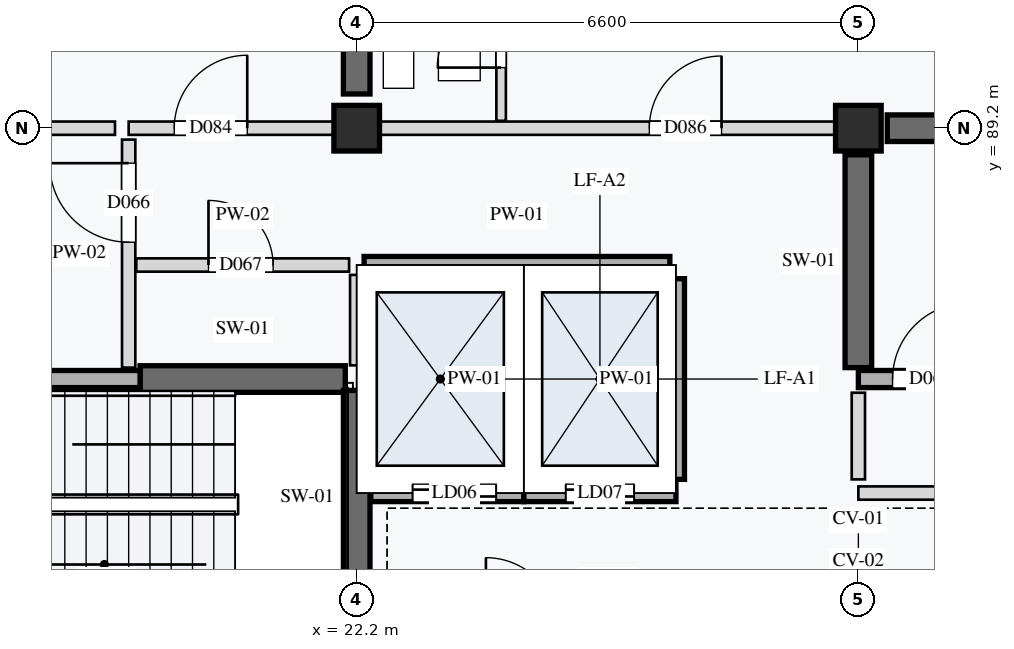
"""IFC4 building model, lengths in metres.
Left out: names, types, materials, properties, quantities, classifications, styles, units other than length and angle.
Written with IfcOpenShell. Run it as: python <this file> out.ifc"""

import sys

from ifc_helpers import new_model, si_unit, direction, frame, frame_2d, origin, origin_2d, place, context, subcontext, project, spatial, rectangle, extrude, element, fill, save


model = new_model("IFC4")
c1 = context("Model", 3, precision=1e-05, world=origin(), true_north=direction((0.0, 1.0)))
c2 = subcontext(c1, "Body", "Model", "MODEL_VIEW")
j1 = project(units=[si_unit("LENGTHUNIT", "METRE"), si_unit("PLANEANGLEUNIT", "RADIAN")], contexts=[c1])
p1 = place(None, origin())
s1 = spatial("IfcSite", under=j1, at=p1, CompositionType="ELEMENT")
p2 = place(p1, origin())
s2 = spatial("IfcBuilding", under=s1, at=p2, CompositionType="ELEMENT")
p3 = place(p2, frame((0.0, 0.0, 8.4)))
s3 = spatial("IfcBuildingStorey", under=s2, at=p3, CompositionType="ELEMENT", Elevation=8.4)
for number, where, z_axis, x_axis in (
    (1, (22.2, 89.2, 0.0), (0.0, 0.0, 1.0), (1.0, 0.0, 0.0)),
    (2, (28.8, 89.2, 0.0), (0.0, 0.0, 1.0), (1.0, 0.0, 0.0)),
):
    element("IfcColumn", number, at=place(p3, frame(where, z_axis=z_axis, x_axis=x_axis)), inside=s3, PredefinedType="COLUMN", context=c2, shape_type="SweptSolid", body=[
        extrude(rectangle(XDim=0.6, YDim=0.6, at=origin_2d()), origin(), (0.0, 0.0, 1.0), 3.2),
    ])
p4 = place(p3, frame((19.35, 85.9, 0.0), z_axis=(0.0, 0.0, 1.0), x_axis=(1.0, 0.0, 0.0)))
e3 = element("IfcWall", 3, at=p4, inside=s3, PredefinedType="SHEAR", context=c2, shape_type="SweptSolid", body=[
    extrude(rectangle(XDim=2.7, YDim=0.35, at=frame_2d((1.35, 0.0))), origin(), (0.0, 0.0, 1.0), 2.96),
])
p5 = place(p3, frame((22.2, 82.95, 0.0), z_axis=(0.0, 0.0, 1.0), x_axis=(0.0, 1.0, 0.0)))
e4 = element("IfcWall", 4, at=p5, inside=s3, PredefinedType="SHEAR", context=c2, shape_type="SweptSolid", body=[
    extrude(rectangle(XDim=2.8, YDim=0.35, at=frame_2d((1.4, 0.0))), origin(), (0.0, 0.0, 1.0), 2.96),
])
p6 = place(p3, frame((29.18, 89.2, 0.0), z_axis=(0.0, 0.0, 1.0), x_axis=(1.0, 0.0, 0.0)))
e5 = element("IfcWall", 5, at=p6, inside=s3, PredefinedType="SHEAR", context=c2, shape_type="SweptSolid", body=[
    extrude(rectangle(XDim=5.84, YDim=0.35, at=frame_2d((2.92, 0.0))), origin(), (0.0, 0.0, 1.0), 2.96),
])
p7 = place(p3, frame((28.8, 86.05, 0.0), z_axis=(0.0, 0.0, 1.0), x_axis=(0.0, 1.0, 0.0)))
e6 = element("IfcWall", 6, at=p7, inside=s3, PredefinedType="SHEAR", context=c2, shape_type="SweptSolid", body=[
    extrude(rectangle(XDim=2.8, YDim=0.35, at=frame_2d((1.4, 0.0))), origin(), (0.0, 0.0, 1.0), 2.96),
])
p8 = place(p3, frame((22.2, 89.65, 0.0), z_axis=(0.0, 0.0, 1.0), x_axis=(0.0, 1.0, 0.0)))
e7 = element("IfcWall", 7, at=p8, inside=s3, PredefinedType="SHEAR", context=c2, shape_type="SweptSolid", body=[
    extrude(rectangle(XDim=5.7, YDim=0.35, at=frame_2d((2.85, 0.0))), origin(), (0.0, 0.0, 1.0), 2.96),
])
p9 = place(p3, frame((15.75, 85.9, 0.0), z_axis=(0.0, 0.0, 1.0), x_axis=(1.0, 0.0, 0.0)))
e8 = element("IfcWall", 8, at=p9, inside=s3, PredefinedType="STANDARD", context=c2, shape_type="SweptSolid", body=[
    extrude(rectangle(XDim=3.6, YDim=0.225, at=frame_2d((1.8, 0.0))), origin(), (0.0, 0.0, 1.0), 2.96),
])
p10 = place(p9, frame((0.45, 0.0, 0.0)))
e9 = element("IfcOpeningElement", 9, at=p10, cuts=e8, PredefinedType="OPENING", context=c2, shape_type="SweptSolid", body=[
    extrude(rectangle(XDim=1.0, YDim=2.16, at=frame_2d((0.5, 1.08))), frame((0.0, 0.123, 0.0), z_axis=(0.0, -1.0, 0.0), x_axis=(1.0, 0.0, 0.0)), (0.0, 0.0, 1.0), 0.245),
])
p11 = place(p3, frame((19.2, 86.05, 0.0), z_axis=(0.0, 0.0, 1.0), x_axis=(0.0, 1.0, 0.0)))
e10 = element("IfcWall", 10, at=p11, inside=s3, PredefinedType="PARTITIONING", context=c2, shape_type="SweptSolid", body=[
    extrude(rectangle(XDim=3.0, YDim=0.175, at=frame_2d((1.5, 0.0))), origin(), (0.0, 0.0, 1.0), 2.96),
])
p12 = place(p11, frame((1.65, 0.0, 0.0)))
e11 = element("IfcOpeningElement", 11, at=p12, cuts=e10, PredefinedType="OPENING", context=c2, shape_type="SweptSolid", body=[
    extrude(rectangle(XDim=1.04, YDim=2.12, at=frame_2d((0.52, 1.06))), frame((0.0, 0.097, 0.0), z_axis=(0.0, -1.0, 0.0), x_axis=(1.0, 0.0, 0.0)), (0.0, 0.0, 1.0), 0.195),
])
p13 = place(p3, frame((19.3, 87.4, 0.0), z_axis=(0.0, 0.0, 1.0), x_axis=(1.0, 0.0, 0.0)))
e12 = element("IfcWall", 12, at=p13, inside=s3, PredefinedType="PARTITIONING", context=c2, shape_type="SweptSolid", body=[
    extrude(rectangle(XDim=2.8, YDim=0.175, at=frame_2d((1.4, 0.0))), origin(), (0.0, 0.0, 1.0), 2.96),
])
p14 = place(p13, frame((0.95, 0.0, 0.0)))
e13 = element("IfcOpeningElement", 13, at=p14, cuts=e12, PredefinedType="OPENING", context=c2, shape_type="SweptSolid", body=[
    extrude(rectangle(XDim=0.85, YDim=2.0, at=frame_2d((0.425, 1.0))), frame((0.0, 0.097, 0.0), z_axis=(0.0, -1.0, 0.0), x_axis=(1.0, 0.0, 0.0)), (0.0, 0.0, 1.0), 0.195),
])
p15 = place(p3, frame((22.2, 86.08, 0.0), z_axis=(0.0, 0.0, 1.0), x_axis=(0.0, 1.0, 0.0)))
e14 = element("IfcWall", 14, at=p15, inside=s3, PredefinedType="PARTITIONING", context=c2, shape_type="SweptSolid", body=[
    extrude(rectangle(XDim=1.19, YDim=0.175, at=frame_2d((0.595, 0.0))), origin(), (0.0, 0.0, 1.0), 2.96),
])
p16 = place(p3, frame((22.385, 84.4, 0.0), z_axis=(0.0, 0.0, 1.0), x_axis=(1.0, 0.0, 0.0)))
e15 = element("IfcWall", 15, at=p16, inside=s3, PredefinedType="STANDARD", context=c2, shape_type="SweptSolid", body=[
    extrude(rectangle(XDim=2.015, YDim=0.225, at=frame_2d((1.007, 0.0))), origin(), (0.0, 0.0, 1.0), 2.96),
])
p17 = place(p16, frame((0.55, 0.0, 0.0)))
e16 = element("IfcOpeningElement", 16, at=p17, cuts=e15, PredefinedType="OPENING", context=c2, shape_type="SweptSolid", body=[
    extrude(rectangle(XDim=1.1, YDim=2.1, at=frame_2d((0.55, 1.05))), frame((0.0, 0.123, 0.0), z_axis=(0.0, -1.0, 0.0), x_axis=(1.0, 0.0, 0.0)), (0.0, 0.0, 1.0), 0.245),
])
p18 = place(p3, frame((24.4, 84.4, 0.0), z_axis=(0.0, 0.0, 1.0), x_axis=(1.0, 0.0, 0.0)))
e17 = element("IfcWall", 17, at=p18, inside=s3, PredefinedType="STANDARD", context=c2, shape_type="SweptSolid", body=[
    extrude(rectangle(XDim=2.0, YDim=0.225, at=frame_2d((1.0, 0.0))), origin(), (0.0, 0.0, 1.0), 2.96),
])
p19 = place(p18, frame((0.55, 0.0, 0.0)))
e18 = element("IfcOpeningElement", 18, at=p19, cuts=e17, PredefinedType="OPENING", context=c2, shape_type="SweptSolid", body=[
    extrude(rectangle(XDim=0.9, YDim=2.1, at=frame_2d((0.45, 1.05))), frame((0.0, 0.123, 0.0), z_axis=(0.0, -1.0, 0.0), x_axis=(1.0, 0.0, 0.0)), (0.0, 0.0, 1.0), 0.245),
])
p20 = place(p3, frame((22.298, 87.4, 0.0), z_axis=(0.0, 0.0, 1.0), x_axis=(1.0, 0.0, 0.0)))
e19 = element("IfcWall", 19, at=p20, inside=s3, PredefinedType="STANDARD", context=c2, shape_type="SweptSolid", body=[
    extrude(rectangle(XDim=4.022, YDim=0.225, at=frame_2d((2.011, 0.0))), origin(), (0.0, 0.0, 1.0), 2.96),
])
for number, where, z_axis, x_axis in (
    (20, (24.4, 84.58, 0.0), (0.0, 0.0, 1.0), (0.0, 1.0, 0.0)),
    (21, (26.4, 84.58, 0.0), (0.0, 0.0, 1.0), (0.0, 1.0, 0.0)),
):
    element("IfcWall", number, at=place(p3, frame(where, z_axis=z_axis, x_axis=x_axis)), inside=s3, PredefinedType="STANDARD", context=c2, shape_type="SweptSolid", body=[
        extrude(rectangle(XDim=2.64, YDim=0.225, at=frame_2d((1.32, 0.0))), origin(), (0.0, 0.0, 1.0), 2.96),
    ])
p21 = place(p3, frame((28.8, 85.9, 0.0), z_axis=(0.0, 0.0, 1.0), x_axis=(1.0, 0.0, 0.0)))
e22 = element("IfcWall", 22, at=p21, inside=s3, PredefinedType="STANDARD", context=c2, shape_type="SweptSolid", body=[
    extrude(rectangle(XDim=3.45, YDim=0.225, at=frame_2d((1.725, 0.0))), origin(), (0.0, 0.0, 1.0), 2.96),
])
p22 = place(p21, frame((0.45, 0.0, 0.0)))
e23 = element("IfcOpeningElement", 23, at=p22, cuts=e22, PredefinedType="OPENING", context=c2, shape_type="SweptSolid", body=[
    extrude(rectangle(XDim=1.0, YDim=2.1, at=frame_2d((0.5, 1.05))), frame((0.0, 0.123, 0.0), z_axis=(0.0, -1.0, 0.0), x_axis=(1.0, 0.0, 0.0)), (0.0, 0.0, 1.0), 0.245),
])
p23 = place(p3, frame((28.8, 84.4, 0.0), z_axis=(0.0, 0.0, 1.0), x_axis=(1.0, 0.0, 0.0)))
e24 = element("IfcWall", 24, at=p23, inside=s3, PredefinedType="PARTITIONING", context=c2, shape_type="SweptSolid", body=[
    extrude(rectangle(XDim=3.3, YDim=0.175, at=frame_2d((1.65, 0.0))), origin(), (0.0, 0.0, 1.0), 2.96),
])
p24 = place(p23, frame((1.8, 0.0, 0.0)))
e25 = element("IfcOpeningElement", 25, at=p24, cuts=e24, PredefinedType="OPENING", context=c2, shape_type="SweptSolid", body=[
    extrude(rectangle(XDim=1.0, YDim=2.16, at=frame_2d((0.5, 1.08))), frame((0.0, 0.097, 0.0), z_axis=(0.0, -1.0, 0.0), x_axis=(1.0, 0.0, 0.0)), (0.0, 0.0, 1.0), 0.195),
])
p25 = place(p3, frame((28.8, 84.58, 0.0), z_axis=(0.0, 0.0, 1.0), x_axis=(0.0, 1.0, 0.0)))
e26 = element("IfcWall", 26, at=p25, inside=s3, PredefinedType="PARTITIONING", context=c2, shape_type="SweptSolid", body=[
    extrude(rectangle(XDim=1.14, YDim=0.175, at=frame_2d((0.57, 0.0))), origin(), (0.0, 0.0, 1.0), 2.96),
])
p26 = place(p3, frame((15.88, 89.2, 0.0), z_axis=(0.0, 0.0, 1.0), x_axis=(1.0, 0.0, 0.0)))
e27 = element("IfcWall", 27, at=p26, inside=s3, PredefinedType="PARTITIONING", context=c2, shape_type="SweptSolid", body=[
    extrude(rectangle(XDim=3.14, YDim=0.175, at=frame_2d((1.57, 0.0))), origin(), (0.0, 0.0, 1.0), 2.55),
])
p27 = place(p3, frame((19.2, 89.2, 0.0), z_axis=(0.0, 0.0, 1.0), x_axis=(1.0, 0.0, 0.0)))
e28 = element("IfcWall", 28, at=p27, inside=s3, PredefinedType="PARTITIONING", context=c2, shape_type="SweptSolid", body=[
    extrude(rectangle(XDim=3.0, YDim=0.175, at=frame_2d((1.5, 0.0))), origin(), (0.0, 0.0, 1.0), 2.55),
])
p28 = place(p27, frame((0.6, 0.0, 0.0)))
e29 = element("IfcOpeningElement", 29, at=p28, cuts=e28, PredefinedType="OPENING", context=c2, shape_type="SweptSolid", body=[
    extrude(rectangle(XDim=0.96, YDim=2.18, at=frame_2d((0.48, 1.09))), frame((0.0, 0.097, 0.0), z_axis=(0.0, -1.0, 0.0), x_axis=(1.0, 0.0, 0.0)), (0.0, 0.0, 1.0), 0.195),
])
p29 = place(p3, frame((22.2, 89.2, 0.0), z_axis=(0.0, 0.0, 1.0), x_axis=(1.0, 0.0, 0.0)))
e30 = element("IfcWall", 30, at=p29, inside=s3, PredefinedType="PARTITIONING", context=c2, shape_type="SweptSolid", body=[
    extrude(rectangle(XDim=6.6, YDim=0.175, at=frame_2d((3.3, 0.0))), origin(), (0.0, 0.0, 1.0), 2.55),
])
p30 = place(p29, frame((3.85, 0.0, 0.0)))
e31 = element("IfcOpeningElement", 31, at=p30, cuts=e30, PredefinedType="OPENING", context=c2, shape_type="SweptSolid", body=[
    extrude(rectangle(XDim=0.95, YDim=2.16, at=frame_2d((0.475, 1.08))), frame((0.0, 0.097, 0.0), z_axis=(0.0, -1.0, 0.0), x_axis=(1.0, 0.0, 0.0)), (0.0, 0.0, 1.0), 0.195),
])
p31 = place(p3, frame((24.1, 89.298, 0.0), z_axis=(0.0, 0.0, 1.0), x_axis=(0.0, 1.0, 0.0)))
e32 = element("IfcWall", 32, at=p31, inside=s3, PredefinedType="PARTITIONING", context=c2, shape_type="SweptSolid", body=[
    extrude(rectangle(XDim=2.302, YDim=0.125, at=frame_2d((1.151, 0.0))), origin(), (0.0, 0.0, 1.0), 2.96),
])
p32 = place(p31, frame((0.7, 0.0, 0.0)))
e33 = element("IfcOpeningElement", 33, at=p32, cuts=e32, PredefinedType="OPENING", context=c2, shape_type="SweptSolid", body=[
    extrude(rectangle(XDim=0.84, YDim=2.06, at=frame_2d((0.42, 1.03))), frame((0.0, 0.073, 0.0), z_axis=(0.0, -1.0, 0.0), x_axis=(1.0, 0.0, 0.0)), (0.0, 0.0, 1.0), 0.145),
])
p33 = place(p12, origin())
e34 = element("IfcDoor", 34, at=p33, inside=s3, OperationType="SINGLE_SWING_RIGHT", PredefinedType="DOOR", context=c2, shape_type="SweptSolid", body=[
    extrude(rectangle(XDim=1.04, YDim=2.12, at=frame_2d((0.52, 1.06))), frame((0.0, 0.025, 0.0), z_axis=(0.0, -1.0, 0.0), x_axis=(1.0, 0.0, 0.0)), (0.0, 0.0, 1.0), 0.05),
])
fill(e11, e34)
p34 = place(p14, origin())
e35 = element("IfcDoor", 35, at=p34, inside=s3, OperationType="SINGLE_SWING_LEFT", PredefinedType="DOOR", context=c2, shape_type="SweptSolid", body=[
    extrude(rectangle(XDim=0.85, YDim=2.0, at=frame_2d((0.425, 1.0))), frame((0.0, 0.025, 0.0), z_axis=(0.0, -1.0, 0.0), x_axis=(1.0, 0.0, 0.0)), (0.0, 0.0, 1.0), 0.05),
])
fill(e13, e35)
p35 = place(p17, origin())
e36 = element("IfcDoor", 36, at=p35, inside=s3, OperationType="DOUBLE_DOOR_SLIDING", PredefinedType="DOOR", context=c2, shape_type="SweptSolid", body=[
    extrude(rectangle(XDim=1.1, YDim=2.1, at=frame_2d((0.55, 1.05))), frame((0.0, 0.025, 0.0), z_axis=(0.0, -1.0, 0.0), x_axis=(1.0, 0.0, 0.0)), (0.0, 0.0, 1.0), 0.05),
])
fill(e16, e36)
p36 = place(p19, origin())
e37 = element("IfcDoor", 37, at=p36, inside=s3, OperationType="DOUBLE_DOOR_SLIDING", PredefinedType="DOOR", context=c2, shape_type="SweptSolid", body=[
    extrude(rectangle(XDim=0.9, YDim=2.1, at=frame_2d((0.45, 1.05))), frame((0.0, 0.025, 0.0), z_axis=(0.0, -1.0, 0.0), x_axis=(1.0, 0.0, 0.0)), (0.0, 0.0, 1.0), 0.05),
])
fill(e18, e37)
p37 = place(p22, origin())
e38 = element("IfcDoor", 38, at=p37, inside=s3, OperationType="SINGLE_SWING_RIGHT", PredefinedType="DOOR", context=c2, shape_type="SweptSolid", body=[
    extrude(rectangle(XDim=1.0, YDim=2.1, at=frame_2d((0.5, 1.05))), frame((0.0, 0.025, 0.0), z_axis=(0.0, -1.0, 0.0), x_axis=(1.0, 0.0, 0.0)), (0.0, 0.0, 1.0), 0.05),
])
fill(e23, e38)
p38 = place(p28, origin())
e39 = element("IfcDoor", 39, at=p38, inside=s3, OperationType="SINGLE_SWING_RIGHT", PredefinedType="DOOR", context=c2, shape_type="SweptSolid", body=[
    extrude(rectangle(XDim=0.96, YDim=2.18, at=frame_2d((0.48, 1.09))), frame((0.0, 0.025, 0.0), z_axis=(0.0, -1.0, 0.0), x_axis=(1.0, 0.0, 0.0)), (0.0, 0.0, 1.0), 0.05),
])
fill(e29, e39)
p39 = place(p30, origin())
e40 = element("IfcDoor", 40, at=p39, inside=s3, OperationType="SINGLE_SWING_RIGHT", PredefinedType="DOOR", context=c2, shape_type="SweptSolid", body=[
    extrude(rectangle(XDim=0.95, YDim=2.16, at=frame_2d((0.475, 1.08))), frame((0.0, 0.025, 0.0), z_axis=(0.0, -1.0, 0.0), x_axis=(1.0, 0.0, 0.0)), (0.0, 0.0, 1.0), 0.05),
])
fill(e31, e40)
p40 = place(p32, origin())
e41 = element("IfcDoor", 41, at=p40, inside=s3, OperationType="SINGLE_SWING_LEFT", PredefinedType="DOOR", context=c2, shape_type="SweptSolid", body=[
    extrude(rectangle(XDim=0.84, YDim=2.06, at=frame_2d((0.42, 1.03))), frame((0.0, 0.025, 0.0), z_axis=(0.0, -1.0, 0.0), x_axis=(1.0, 0.0, 0.0)), (0.0, 0.0, 1.0), 0.05),
])
fill(e33, e41)
save(model, sys.argv[1])
